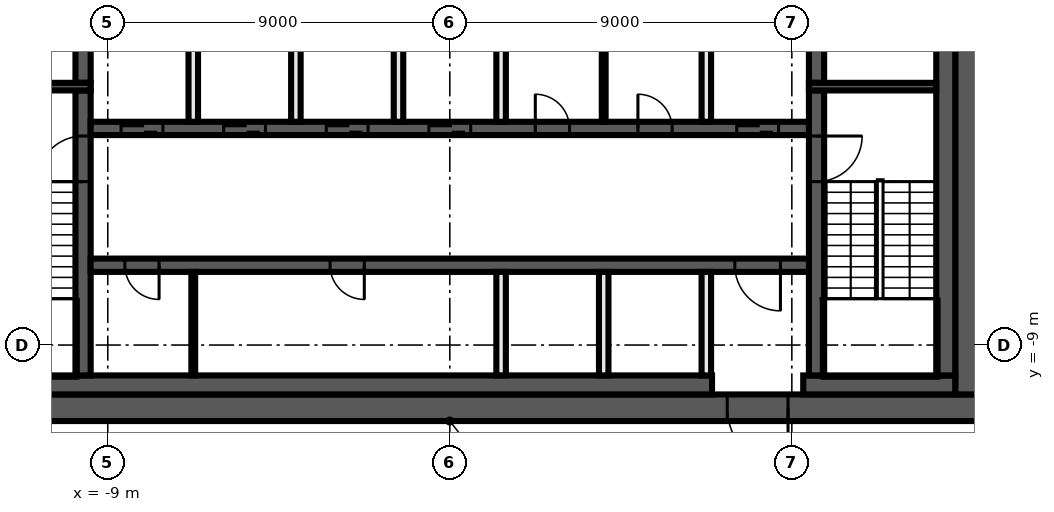
"""IFC4 building model, lengths in metres.
Left out: names, types, materials, properties, quantities, classifications, styles, units other than length and angle.
Written with IfcOpenShell. Run it as: python <this file> out.ifc"""

import sys

from ifc_helpers import new_model, si_unit, direction, frame, frame_2d, origin, place, context, subcontext, project, spatial, rectangle, extrude, element, fill, save


model = new_model("IFC4")
c1 = context("Model", 3, precision=1e-05, world=origin(), true_north=direction((0.0, 1.0)))
c2 = subcontext(c1, "Body", "Model", "MODEL_VIEW")
j1 = project(units=[si_unit("LENGTHUNIT", "METRE"), si_unit("PLANEANGLEUNIT", "RADIAN")], contexts=[c1])
p1 = place(None, origin())
s1 = spatial("IfcSite", under=j1, at=p1, CompositionType="ELEMENT")
p2 = place(p1, origin())
s2 = spatial("IfcBuilding", under=s1, at=p2, CompositionType="ELEMENT")
p3 = place(p2, frame((0.0, 0.0, 262.2)))
s3 = spatial("IfcBuildingStorey", under=s2, at=p3, CompositionType="ELEMENT", Elevation=262.2)
p4 = place(p3, frame((14.0, -10.65, 0.0), z_axis=(0.0, 0.0, 1.0), x_axis=(-1.0, 0.0, 0.0)))
e1 = element("IfcWall", 1, at=p4, inside=s3, PredefinedType="SHEAR", context=c2, shape_type="SweptSolid", body=[
    extrude(rectangle(XDim=28.0, YDim=0.7, at=frame_2d((14.0, 0.0))), origin(), (0.0, 0.0, 1.0), 3.82),
])
p5 = place(p4, frame((5.1, 0.0, 0.0)))
e2 = element("IfcOpeningElement", 2, at=p5, cuts=e1, PredefinedType="OPENING", context=c2, shape_type="SweptSolid", body=[
    extrude(rectangle(XDim=1.6, YDim=2.1, at=frame_2d((0.8, 1.05))), frame((0.0, 0.36, 0.0), z_axis=(0.0, -1.0, 0.0), x_axis=(1.0, 0.0, 0.0)), (0.0, 0.0, 1.0), 0.72),
])
p6 = place(p3, frame((13.65, 10.3, 0.0), z_axis=(0.0, 0.0, 1.0), x_axis=(0.0, -1.0, 0.0)))
e3 = element("IfcWall", 3, at=p6, inside=s3, PredefinedType="SHEAR", context=c2, shape_type="SweptSolid", body=[
    extrude(rectangle(XDim=20.6, YDim=0.7, at=frame_2d((10.3, 0.0))), origin(), (0.0, 0.0, 1.0), 3.82),
])
p7 = place(p3, frame((13.3, -10.05, 0.0), z_axis=(0.0, 0.0, 1.0), x_axis=(-1.0, 0.0, 0.0)))
e4 = element("IfcWall", 4, at=p7, inside=s3, PredefinedType="SHEAR", context=c2, shape_type="SweptSolid", body=[
    extrude(rectangle(XDim=4.0, YDim=0.5, at=frame_2d((2.0, 0.0))), origin(), (0.0, 0.0, 1.0), 3.82),
])
p8 = place(p3, frame((6.9, -10.05, 0.0), z_axis=(0.0, 0.0, 1.0), x_axis=(-1.0, 0.0, 0.0)))
e5 = element("IfcWall", 5, at=p8, inside=s3, PredefinedType="SHEAR", context=c2, shape_type="SweptSolid", body=[
    extrude(rectangle(XDim=20.2, YDim=0.5, at=frame_2d((10.1, 0.0))), origin(), (0.0, 0.0, 1.0), 3.82),
])
p9 = place(p3, frame((13.05, 9.8, 0.0), z_axis=(0.0, 0.0, 1.0), x_axis=(0.0, -1.0, 0.0)))
e6 = element("IfcWall", 6, at=p9, inside=s3, PredefinedType="SHEAR", context=c2, shape_type="SweptSolid", body=[
    extrude(rectangle(XDim=19.6, YDim=0.5, at=frame_2d((9.8, 0.0))), origin(), (0.0, 0.0, 1.0), 3.82),
])
p10 = place(p3, frame((9.65, -2.3, 0.0), z_axis=(0.0, 0.0, 1.0), x_axis=(0.0, -1.0, 0.0)))
e7 = element("IfcWall", 7, at=p10, inside=s3, PredefinedType="SHEAR", context=c2, shape_type="SweptSolid", body=[
    extrude(rectangle(XDim=7.5, YDim=0.4, at=frame_2d((3.75, 0.0))), origin(), (0.0, 0.0, 1.0), 3.82),
])
p11 = place(p10, frame((1.2, 0.0, 0.0)))
e8 = element("IfcOpeningElement", 8, at=p11, cuts=e7, PredefinedType="OPENING", context=c2, shape_type="SweptSolid", body=[
    extrude(rectangle(XDim=1.2, YDim=2.1, at=frame_2d((0.6, 1.05))), frame((0.0, 0.21, 0.0), z_axis=(0.0, -1.0, 0.0), x_axis=(1.0, 0.0, 0.0)), (0.0, 0.0, 1.0), 0.42),
])
p12 = place(p3, frame((9.65, 2.1, 0.0), z_axis=(0.0, 0.0, 1.0), x_axis=(0.0, -1.0, 0.0)))
e9 = element("IfcWall", 9, at=p12, inside=s3, PredefinedType="SHEAR", context=c2, shape_type="SweptSolid", body=[
    extrude(rectangle(XDim=4.2, YDim=0.4, at=frame_2d((2.1, 0.0))), origin(), (0.0, 0.0, 1.0), 3.82),
])
p13 = place(p12, frame((0.15, 0.0, 0.0)))
e10 = element("IfcOpeningElement", 10, at=p13, cuts=e9, PredefinedType="OPENING", context=c2, shape_type="SweptSolid", body=[
    extrude(rectangle(XDim=0.9, YDim=2.1, at=frame_2d((0.45, 1.05))), frame((0.0, 0.21, 0.0), z_axis=(0.0, -1.0, 0.0), x_axis=(1.0, 0.0, 0.0)), (0.0, 0.0, 1.0), 0.42),
])
p14 = place(p3, frame((-9.65, -9.8, 0.0), z_axis=(0.0, 0.0, 1.0), x_axis=(0.0, 1.0, 0.0)))
e11 = element("IfcWall", 11, at=p14, inside=s3, PredefinedType="SHEAR", context=c2, shape_type="SweptSolid", body=[
    extrude(rectangle(XDim=7.5, YDim=0.4, at=frame_2d((3.75, 0.0))), origin(), (0.0, 0.0, 1.0), 3.82),
])
p15 = place(p14, frame((5.1, 0.0, 0.0)))
e12 = element("IfcOpeningElement", 12, at=p15, cuts=e11, PredefinedType="OPENING", context=c2, shape_type="SweptSolid", body=[
    extrude(rectangle(XDim=1.2, YDim=2.1, at=frame_2d((0.6, 1.05))), frame((0.0, 0.21, 0.0), z_axis=(0.0, -1.0, 0.0), x_axis=(1.0, 0.0, 0.0)), (0.0, 0.0, 1.0), 0.42),
])
p16 = place(p3, frame((-9.65, -2.1, 0.0), z_axis=(0.0, 0.0, 1.0), x_axis=(0.0, 1.0, 0.0)))
e13 = element("IfcWall", 13, at=p16, inside=s3, PredefinedType="SHEAR", context=c2, shape_type="SweptSolid", body=[
    extrude(rectangle(XDim=4.2, YDim=0.4, at=frame_2d((2.1, 0.0))), origin(), (0.0, 0.0, 1.0), 3.82),
])
for number, where, z_axis, x_axis in (
    (14, (9.45, -2.2, 0.0), (0.0, 0.0, 1.0), (1.0, 0.0, 0.0)),
    (15, (-9.45, -2.2, 0.0), (0.0, 0.0, 1.0), (-1.0, 0.0, 0.0)),
):
    element("IfcWall", number, at=place(p3, frame(where, z_axis=z_axis, x_axis=x_axis)), inside=s3, PredefinedType="SHEAR", context=c2, shape_type="SweptSolid", body=[
        extrude(rectangle(XDim=3.35, YDim=0.2, at=frame_2d((1.675, 0.0))), origin(), (0.0, 0.0, 1.0), 3.82),
    ])
p17 = place(p3, frame((-9.45, -3.3, 0.0), z_axis=(0.0, 0.0, 1.0), x_axis=(1.0, 0.0, 0.0)))
e16 = element("IfcWall", 16, at=p17, inside=s3, PredefinedType="SHEAR", context=c2, shape_type="SweptSolid", body=[
    extrude(rectangle(XDim=18.9, YDim=0.35, at=frame_2d((9.45, 0.0))), origin(), (0.0, 0.0, 1.0), 3.82),
])
p18 = place(p17, frame((0.8, 0.0, 0.0)))
e17 = element("IfcOpeningElement", 17, at=p18, cuts=e16, PredefinedType="OPENING", context=c2, shape_type="SweptSolid", body=[
    extrude(rectangle(XDim=1.1, YDim=2.1, at=frame_2d((0.55, 1.05))), frame((0.0, 0.185, 0.0), z_axis=(0.0, -1.0, 0.0), x_axis=(1.0, 0.0, 0.0)), (0.0, 0.0, 1.0), 0.37),
])
p19 = place(p17, frame((3.5, 0.0, 0.0)))
e18 = element("IfcOpeningElement", 18, at=p19, cuts=e16, PredefinedType="OPENING", context=c2, shape_type="SweptSolid", body=[
    extrude(rectangle(XDim=1.1, YDim=2.1, at=frame_2d((0.55, 1.05))), frame((0.0, 0.185, 0.0), z_axis=(0.0, -1.0, 0.0), x_axis=(1.0, 0.0, 0.0)), (0.0, 0.0, 1.0), 0.37),
])
p20 = place(p17, frame((6.2, 0.0, 0.0)))
e19 = element("IfcOpeningElement", 19, at=p20, cuts=e16, PredefinedType="OPENING", context=c2, shape_type="SweptSolid", body=[
    extrude(rectangle(XDim=1.1, YDim=2.1, at=frame_2d((0.55, 1.05))), frame((0.0, 0.185, 0.0), z_axis=(0.0, -1.0, 0.0), x_axis=(1.0, 0.0, 0.0)), (0.0, 0.0, 1.0), 0.37),
])
p21 = place(p17, frame((8.9, 0.0, 0.0)))
e20 = element("IfcOpeningElement", 20, at=p21, cuts=e16, PredefinedType="OPENING", context=c2, shape_type="SweptSolid", body=[
    extrude(rectangle(XDim=1.1, YDim=2.1, at=frame_2d((0.55, 1.05))), frame((0.0, 0.185, 0.0), z_axis=(0.0, -1.0, 0.0), x_axis=(1.0, 0.0, 0.0)), (0.0, 0.0, 1.0), 0.37),
])
p22 = place(p17, frame((17.0, 0.0, 0.0)))
e21 = element("IfcOpeningElement", 21, at=p22, cuts=e16, PredefinedType="OPENING", context=c2, shape_type="SweptSolid", body=[
    extrude(rectangle(XDim=1.1, YDim=2.1, at=frame_2d((0.55, 1.05))), frame((0.0, 0.185, 0.0), z_axis=(0.0, -1.0, 0.0), x_axis=(1.0, 0.0, 0.0)), (0.0, 0.0, 1.0), 0.37),
])
p23 = place(p17, frame((11.7, 0.0, 0.0)))
e22 = element("IfcOpeningElement", 22, at=p23, cuts=e16, PredefinedType="OPENING", context=c2, shape_type="SweptSolid", body=[
    extrude(rectangle(XDim=0.9, YDim=2.1, at=frame_2d((0.45, 1.05))), frame((0.0, 0.185, 0.0), z_axis=(0.0, -1.0, 0.0), x_axis=(1.0, 0.0, 0.0)), (0.0, 0.0, 1.0), 0.37),
])
p24 = place(p17, frame((14.4, 0.0, 0.0)))
e23 = element("IfcOpeningElement", 23, at=p24, cuts=e16, PredefinedType="OPENING", context=c2, shape_type="SweptSolid", body=[
    extrude(rectangle(XDim=0.9, YDim=2.1, at=frame_2d((0.45, 1.05))), frame((0.0, 0.185, 0.0), z_axis=(0.0, -1.0, 0.0), x_axis=(1.0, 0.0, 0.0)), (0.0, 0.0, 1.0), 0.37),
])
p25 = place(p3, frame((9.45, -6.9, 0.0), z_axis=(0.0, 0.0, 1.0), x_axis=(-1.0, 0.0, 0.0)))
e24 = element("IfcWall", 24, at=p25, inside=s3, PredefinedType="SHEAR", context=c2, shape_type="SweptSolid", body=[
    extrude(rectangle(XDim=18.9, YDim=0.35, at=frame_2d((9.45, 0.0))), origin(), (0.0, 0.0, 1.0), 3.82),
])
p26 = place(p25, frame((0.75, 0.0, 0.0)))
e25 = element("IfcOpeningElement", 25, at=p26, cuts=e24, PredefinedType="OPENING", context=c2, shape_type="SweptSolid", body=[
    extrude(rectangle(XDim=1.2, YDim=2.1, at=frame_2d((0.6, 1.05))), frame((0.0, 0.185, 0.0), z_axis=(0.0, -1.0, 0.0), x_axis=(1.0, 0.0, 0.0)), (0.0, 0.0, 1.0), 0.37),
])
p27 = place(p25, frame((17.1, 0.0, 0.0)))
e26 = element("IfcOpeningElement", 26, at=p27, cuts=e24, PredefinedType="OPENING", context=c2, shape_type="SweptSolid", body=[
    extrude(rectangle(XDim=0.9, YDim=2.1, at=frame_2d((0.45, 1.05))), frame((0.0, 0.185, 0.0), z_axis=(0.0, -1.0, 0.0), x_axis=(1.0, 0.0, 0.0)), (0.0, 0.0, 1.0), 0.37),
])
p28 = place(p25, frame((11.7, 0.0, 0.0)))
e27 = element("IfcOpeningElement", 27, at=p28, cuts=e24, PredefinedType="OPENING", context=c2, shape_type="SweptSolid", body=[
    extrude(rectangle(XDim=0.9, YDim=2.1, at=frame_2d((0.45, 1.05))), frame((0.0, 0.185, 0.0), z_axis=(0.0, -1.0, 0.0), x_axis=(1.0, 0.0, 0.0)), (0.0, 0.0, 1.0), 0.37),
])
for number, where, z_axis, x_axis in (
    (28, (6.75, -9.8, 0.0), (0.0, 0.0, 1.0), (0.0, 1.0, 0.0)),
    (29, (6.75, -3.125, 0.0), (0.0, 0.0, 1.0), (0.0, 1.0, 0.0)),
):
    element("IfcWall", number, at=place(p3, frame(where, z_axis=z_axis, x_axis=x_axis)), inside=s3, PredefinedType="SOLIDWALL", context=c2, shape_type="SweptSolid", body=[
        extrude(rectangle(XDim=2.725, YDim=0.25, at=frame_2d((1.363, 0.0))), origin(), (0.0, 0.0, 1.0), 3.82),
    ])
p29 = place(p3, frame((4.05, -3.125, 0.0), z_axis=(0.0, 0.0, 1.0), x_axis=(0.0, 1.0, 0.0)))
e30 = element("IfcWall", 30, at=p29, inside=s3, PredefinedType="PARTITIONING", context=c2, shape_type="SweptSolid", body=[
    extrude(rectangle(XDim=2.725, YDim=0.1, at=frame_2d((1.363, 0.0))), origin(), (0.0, 0.0, 1.0), 3.82),
])
for number, where, z_axis, x_axis in (
    (31, (4.05, -9.8, 0.0), (0.0, 0.0, 1.0), (0.0, 1.0, 0.0)),
    (32, (1.35, -9.8, 0.0), (0.0, 0.0, 1.0), (0.0, 1.0, 0.0)),
    (33, (1.35, -3.125, 0.0), (0.0, 0.0, 1.0), (0.0, 1.0, 0.0)),
    (34, (-1.35, -3.125, 0.0), (0.0, 0.0, 1.0), (0.0, 1.0, 0.0)),
    (35, (-4.05, -3.125, 0.0), (0.0, 0.0, 1.0), (0.0, 1.0, 0.0)),
):
    element("IfcWall", number, at=place(p3, frame(where, z_axis=z_axis, x_axis=x_axis)), inside=s3, PredefinedType="SOLIDWALL", context=c2, shape_type="SweptSolid", body=[
        extrude(rectangle(XDim=2.725, YDim=0.25, at=frame_2d((1.363, 0.0))), origin(), (0.0, 0.0, 1.0), 3.82),
    ])
p30 = place(p3, frame((-6.75, -9.8, 0.0), z_axis=(0.0, 0.0, 1.0), x_axis=(0.0, 1.0, 0.0)))
e36 = element("IfcWall", 36, at=p30, inside=s3, PredefinedType="PARTITIONING", context=c2, shape_type="SweptSolid", body=[
    extrude(rectangle(XDim=2.725, YDim=0.1, at=frame_2d((1.363, 0.0))), origin(), (0.0, 0.0, 1.0), 3.82),
])
p31 = place(p3, frame((-6.75, -3.125, 0.0), z_axis=(0.0, 0.0, 1.0), x_axis=(0.0, 1.0, 0.0)))
e37 = element("IfcWall", 37, at=p31, inside=s3, PredefinedType="SOLIDWALL", context=c2, shape_type="SweptSolid", body=[
    extrude(rectangle(XDim=2.725, YDim=0.25, at=frame_2d((1.363, 0.0))), origin(), (0.0, 0.0, 1.0), 3.82),
])
p32 = place(p18, origin())
e38 = element("IfcDoor", 38, at=p32, inside=s3, OperationType="DOUBLE_DOOR_SLIDING", PredefinedType="DOOR", context=c2, shape_type="SweptSolid", body=[
    extrude(rectangle(XDim=1.1, YDim=2.1, at=frame_2d((0.55, 1.05))), frame((0.0, 0.025, 0.0), z_axis=(0.0, -1.0, 0.0), x_axis=(1.0, 0.0, 0.0)), (0.0, 0.0, 1.0), 0.05),
])
fill(e17, e38)
p33 = place(p19, origin())
e39 = element("IfcDoor", 39, at=p33, inside=s3, OperationType="DOUBLE_DOOR_SLIDING", PredefinedType="DOOR", context=c2, shape_type="SweptSolid", body=[
    extrude(rectangle(XDim=1.1, YDim=2.1, at=frame_2d((0.55, 1.05))), frame((0.0, 0.025, 0.0), z_axis=(0.0, -1.0, 0.0), x_axis=(1.0, 0.0, 0.0)), (0.0, 0.0, 1.0), 0.05),
])
fill(e18, e39)
p34 = place(p20, origin())
e40 = element("IfcDoor", 40, at=p34, inside=s3, OperationType="DOUBLE_DOOR_SLIDING", PredefinedType="DOOR", context=c2, shape_type="SweptSolid", body=[
    extrude(rectangle(XDim=1.1, YDim=2.1, at=frame_2d((0.55, 1.05))), frame((0.0, 0.025, 0.0), z_axis=(0.0, -1.0, 0.0), x_axis=(1.0, 0.0, 0.0)), (0.0, 0.0, 1.0), 0.05),
])
fill(e19, e40)
p35 = place(p21, origin())
e41 = element("IfcDoor", 41, at=p35, inside=s3, OperationType="DOUBLE_DOOR_SLIDING", PredefinedType="DOOR", context=c2, shape_type="SweptSolid", body=[
    extrude(rectangle(XDim=1.1, YDim=2.1, at=frame_2d((0.55, 1.05))), frame((0.0, 0.025, 0.0), z_axis=(0.0, -1.0, 0.0), x_axis=(1.0, 0.0, 0.0)), (0.0, 0.0, 1.0), 0.05),
])
fill(e20, e41)
p36 = place(p22, origin())
e42 = element("IfcDoor", 42, at=p36, inside=s3, OperationType="DOUBLE_DOOR_SLIDING", PredefinedType="DOOR", context=c2, shape_type="SweptSolid", body=[
    extrude(rectangle(XDim=1.1, YDim=2.1, at=frame_2d((0.55, 1.05))), frame((0.0, 0.025, 0.0), z_axis=(0.0, -1.0, 0.0), x_axis=(1.0, 0.0, 0.0)), (0.0, 0.0, 1.0), 0.05),
])
fill(e21, e42)
p37 = place(p5, origin())
e43 = element("IfcDoor", 43, at=p37, inside=s3, OperationType="DOUBLE_DOOR_SINGLE_SWING", PredefinedType="DOOR", context=c2, shape_type="SweptSolid", body=[
    extrude(rectangle(XDim=1.6, YDim=2.1, at=frame_2d((0.8, 1.05))), frame((0.0, 0.025, 0.0), z_axis=(0.0, -1.0, 0.0), x_axis=(1.0, 0.0, 0.0)), (0.0, 0.0, 1.0), 0.05),
])
fill(e2, e43)
p38 = place(p26, origin())
e44 = element("IfcDoor", 44, at=p38, inside=s3, OperationType="SINGLE_SWING_LEFT", PredefinedType="DOOR", context=c2, shape_type="SweptSolid", body=[
    extrude(rectangle(XDim=1.2, YDim=2.1, at=frame_2d((0.6, 1.05))), frame((0.0, 0.025, 0.0), z_axis=(0.0, -1.0, 0.0), x_axis=(1.0, 0.0, 0.0)), (0.0, 0.0, 1.0), 0.05),
])
fill(e25, e44)
p39 = place(p23, origin())
e45 = element("IfcDoor", 45, at=p39, inside=s3, OperationType="SINGLE_SWING_RIGHT", PredefinedType="DOOR", context=c2, shape_type="SweptSolid", body=[
    extrude(rectangle(XDim=0.9, YDim=2.1, at=frame_2d((0.45, 1.05))), frame((0.0, 0.025, 0.0), z_axis=(0.0, -1.0, 0.0), x_axis=(1.0, 0.0, 0.0)), (0.0, 0.0, 1.0), 0.05),
])
fill(e22, e45)
p40 = place(p24, origin())
e46 = element("IfcDoor", 46, at=p40, inside=s3, OperationType="SINGLE_SWING_LEFT", PredefinedType="DOOR", context=c2, shape_type="SweptSolid", body=[
    extrude(rectangle(XDim=0.9, YDim=2.1, at=frame_2d((0.45, 1.05))), frame((0.0, 0.025, 0.0), z_axis=(0.0, -1.0, 0.0), x_axis=(1.0, 0.0, 0.0)), (0.0, 0.0, 1.0), 0.05),
])
fill(e23, e46)
p41 = place(p27, origin())
e47 = element("IfcDoor", 47, at=p41, inside=s3, OperationType="SINGLE_SWING_RIGHT", PredefinedType="DOOR", context=c2, shape_type="SweptSolid", body=[
    extrude(rectangle(XDim=0.9, YDim=2.1, at=frame_2d((0.45, 1.05))), frame((0.0, 0.025, 0.0), z_axis=(0.0, -1.0, 0.0), x_axis=(1.0, 0.0, 0.0)), (0.0, 0.0, 1.0), 0.05),
])
fill(e26, e47)
p42 = place(p28, origin())
e48 = element("IfcDoor", 48, at=p42, inside=s3, OperationType="SINGLE_SWING_LEFT", PredefinedType="DOOR", context=c2, shape_type="SweptSolid", body=[
    extrude(rectangle(XDim=0.9, YDim=2.1, at=frame_2d((0.45, 1.05))), frame((0.0, 0.025, 0.0), z_axis=(0.0, -1.0, 0.0), x_axis=(1.0, 0.0, 0.0)), (0.0, 0.0, 1.0), 0.05),
])
fill(e27, e48)
p43 = place(p11, origin())
e49 = element("IfcDoor", 49, at=p43, inside=s3, OperationType="SINGLE_SWING_RIGHT", PredefinedType="DOOR", context=c2, shape_type="SweptSolid", body=[
    extrude(rectangle(XDim=1.2, YDim=2.1, at=frame_2d((0.6, 1.05))), frame((0.0, 0.025, 0.0), z_axis=(0.0, -1.0, 0.0), x_axis=(1.0, 0.0, 0.0)), (0.0, 0.0, 1.0), 0.05),
])
fill(e8, e49)
p44 = place(p15, origin())
e50 = element("IfcDoor", 50, at=p44, inside=s3, OperationType="SINGLE_SWING_LEFT", PredefinedType="DOOR", context=c2, shape_type="SweptSolid", body=[
    extrude(rectangle(XDim=1.2, YDim=2.1, at=frame_2d((0.6, 1.05))), frame((0.0, 0.025, 0.0), z_axis=(0.0, -1.0, 0.0), x_axis=(1.0, 0.0, 0.0)), (0.0, 0.0, 1.0), 0.05),
])
fill(e12, e50)
save(model, sys.argv[1])
